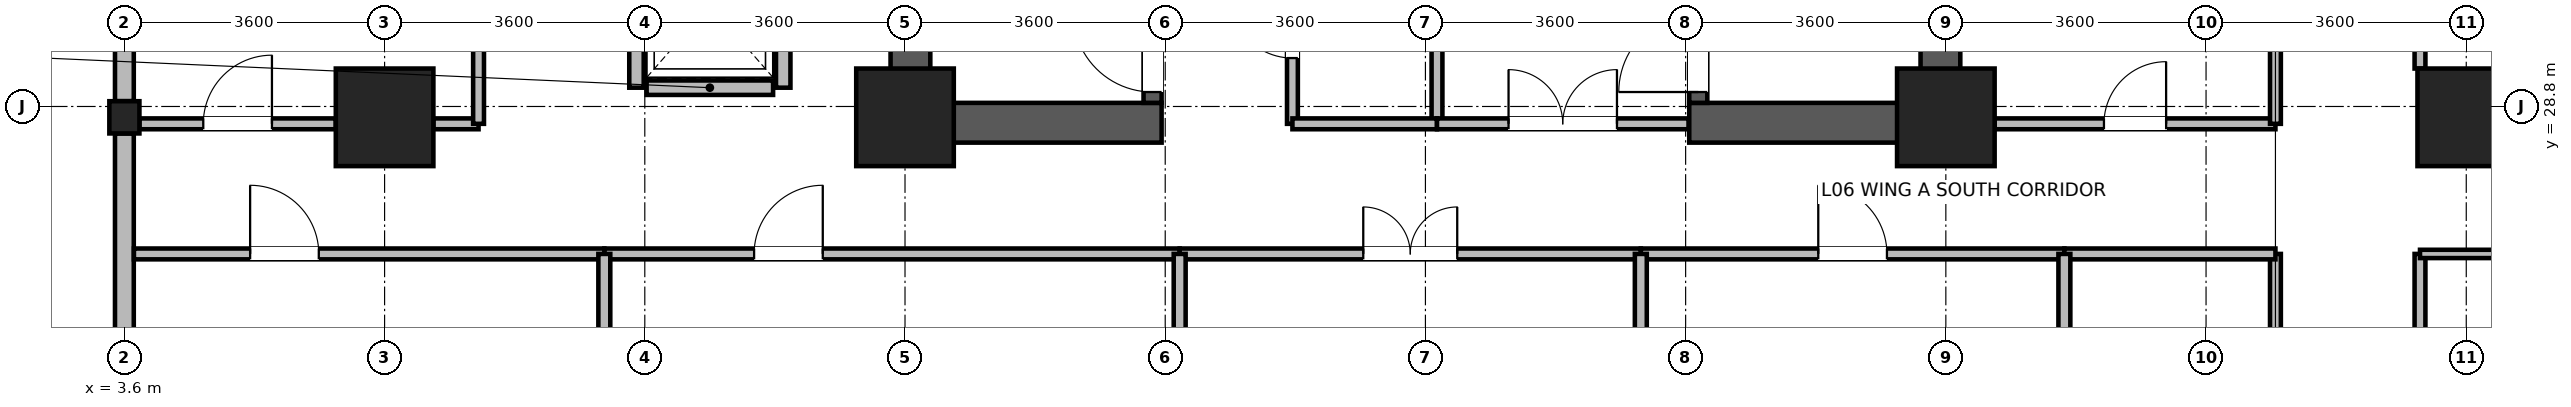
"""IFC4 building model, lengths in metres.
Left out: names, types, materials, properties, quantities, classifications, styles, units other than length and angle.
Written with IfcOpenShell. Run it as: python <this file> out.ifc"""

import sys

from ifc_helpers import new_model, si_unit, direction, frame, frame_2d, origin, origin_2d, place, context, subcontext, project, spatial, rectangle, i_section, extrude, source, transform, mapped, element, fill, save


model = new_model("IFC4")
c1 = context("Model", 3, precision=1e-05, world=origin(), true_north=direction((0.0, 1.0)))
c2 = subcontext(c1, "Body", "Model", "MODEL_VIEW")
j1 = project(units=[si_unit("LENGTHUNIT", "METRE"), si_unit("PLANEANGLEUNIT", "RADIAN")], contexts=[c1])
p1 = place(None, origin())
s1 = spatial("IfcSite", under=j1, at=p1, CompositionType="ELEMENT")
p2 = place(p1, origin())
s2 = spatial("IfcBuilding", under=s1, at=p2, CompositionType="ELEMENT")
p3 = place(p2, frame((0.0, 0.0, 29.0)))
s3 = spatial("IfcBuildingStorey", under=s2, at=p3, CompositionType="ELEMENT", Elevation=29.0)
for number, where, z_axis, x_axis in (
    (1, (14.475, 28.3, 0.0), (0.0, 0.0, 1.0), (0.0, 1.0, 0.0)),
    (2, (28.725, 28.3, 0.0), (0.0, 0.0, 1.0), (0.0, 1.0, 0.0)),
):
    element("IfcWall", number, at=place(p3, frame(where, z_axis=z_axis, x_axis=x_axis)), inside=s3, PredefinedType="SHEAR", context=c2, shape_type="SweptSolid", body=[
        extrude(rectangle(XDim=8.1, YDim=0.55, at=frame_2d((4.05, 0.0))), origin(), (0.0, 0.0, 1.0), 3.45),
    ])
for number, where, z_axis, x_axis in (
    (3, (14.75, 28.575, 0.0), (0.0, 0.0, 1.0), (1.0, 0.0, 0.0)),
    (4, (25.25, 28.575, 0.0), (0.0, 0.0, 1.0), (1.0, 0.0, 0.0)),
):
    element("IfcWall", number, at=place(p3, frame(where, z_axis=z_axis, x_axis=x_axis)), inside=s3, PredefinedType="SHEAR", context=c2, shape_type="SweptSolid", body=[
        extrude(rectangle(XDim=3.2, YDim=0.55, at=frame_2d((1.6, 0.0))), origin(), (0.0, 0.0, 1.0), 3.45),
    ])
p4 = place(p3, frame((17.825, 28.85, 0.0), z_axis=(0.0, 0.0, 1.0), x_axis=(0.0, 1.0, 0.0)))
e5 = element("IfcWall", 5, at=p4, inside=s3, PredefinedType="SHEAR", context=c2, shape_type="SweptSolid", body=[
    extrude(rectangle(XDim=7.0, YDim=0.25, at=frame_2d((3.5, 0.0))), origin(), (0.0, 0.0, 1.0), 3.45),
])
p5 = place(p4, frame((0.15, 0.0, 0.0)))
e6 = element("IfcOpeningElement", 6, at=p5, cuts=e5, PredefinedType="OPENING", context=c2, shape_type="SweptSolid", body=[
    extrude(rectangle(XDim=1.1, YDim=2.08, at=frame_2d((0.55, 1.04))), frame((0.0, 0.135, 0.0), z_axis=(0.0, -1.0, 0.0), x_axis=(1.0, 0.0, 0.0)), (0.0, 0.0, 1.0), 0.27),
])
p6 = place(p3, frame((25.375, 28.85, 0.0), z_axis=(0.0, 0.0, 1.0), x_axis=(0.0, 1.0, 0.0)))
e7 = element("IfcWall", 7, at=p6, inside=s3, PredefinedType="SHEAR", context=c2, shape_type="SweptSolid", body=[
    extrude(rectangle(XDim=7.0, YDim=0.25, at=frame_2d((3.5, 0.0))), origin(), (0.0, 0.0, 1.0), 3.45),
])
p7 = place(p6, frame((0.15, 0.0, 0.0)))
e8 = element("IfcOpeningElement", 8, at=p7, cuts=e7, PredefinedType="OPENING", context=c2, shape_type="SweptSolid", body=[
    extrude(rectangle(XDim=1.1, YDim=2.08, at=frame_2d((0.55, 1.04))), frame((0.0, 0.135, 0.0), z_axis=(0.0, -1.0, 0.0), x_axis=(1.0, 0.0, 0.0)), (0.0, 0.0, 1.0), 0.27),
])
m1 = source(origin(), c2, "Body", "SweptSolid", [
    extrude(rectangle(XDim=1.35, YDim=1.35, at=origin_2d()), origin(), (0.0, 0.0, 1.0), 3.7),
])
for number, where, z_axis, x_axis in (
    (9, (7.2, 28.65, 0.0), (0.0, 0.0, 1.0), (1.0, 0.0, 0.0)),
    (10, (14.4, 28.65, 0.0), (0.0, 0.0, 1.0), (1.0, 0.0, 0.0)),
    (11, (28.8, 28.65, 0.0), (0.0, 0.0, 1.0), (1.0, 0.0, 0.0)),
    (12, (36.0, 28.65, 0.0), (0.0, 0.0, 1.0), (1.0, 0.0, 0.0)),
):
    element("IfcColumn", number, at=place(p3, frame(where, z_axis=z_axis, x_axis=x_axis)), inside=s3, PredefinedType="COLUMN", context=c2, shape_type="MappedRepresentation", body=[
        mapped(m1, transform((0.0, 0.0, 0.0), x_axis=(1.0, 0.0, 0.0), y_axis=(0.0, 1.0, 0.0), z_axis=(0.0, 0.0, 1.0), scale=1.0)),
    ])
m2 = source(origin(), c2, "Body", "SweptSolid", [
    extrude(i_section(OverallWidth=0.416, OverallDepth=0.446, WebThickness=0.029, FlangeThickness=0.04, FilletRadius=0.015, at=origin_2d()), origin(), (0.0, 0.0, 1.0), 3.7),
])
p8 = place(p3, frame((3.6, 28.65, 0.0), z_axis=(0.0, 0.0, 1.0), x_axis=(1.0, 0.0, 0.0)))
e13 = element("IfcColumn", 13, at=p8, inside=s3, PredefinedType="COLUMN", context=c2, shape_type="MappedRepresentation", body=[
    mapped(m2, transform((0.0, 0.0, 0.0), x_axis=(1.0, 0.0, 0.0), y_axis=(0.0, 1.0, 0.0), z_axis=(0.0, 0.0, 1.0), scale=1.0)),
])
p9 = place(p3, frame((3.6, 28.874, 0.0), z_axis=(0.0, 0.0, 1.0), x_axis=(0.0, 1.0, 0.0)))
e14 = element("IfcWall", 14, at=p9, inside=s3, PredefinedType="STANDARD", context=c2, shape_type="SweptSolid", body=[
    extrude(rectangle(XDim=7.052, YDim=0.26, at=frame_2d((3.526, 0.0))), origin(), (0.0, 0.0, 1.0), 2.93),
])
p10 = place(p9, frame((0.863, 0.0, 0.85)))
e15 = element("IfcOpeningElement", 15, at=p10, cuts=e14, PredefinedType="OPENING", context=c2, shape_type="SweptSolid", body=[
    extrude(rectangle(XDim=1.8, YDim=1.85, at=frame_2d((0.9, 0.925))), frame((0.0, 0.14, 0.0), z_axis=(0.0, -1.0, 0.0), x_axis=(1.0, 0.0, 0.0)), (0.0, 0.0, 1.0), 0.28),
])
p11 = place(p9, frame((4.389, 0.0, 0.85)))
e16 = element("IfcOpeningElement", 16, at=p11, cuts=e14, PredefinedType="OPENING", context=c2, shape_type="SweptSolid", body=[
    extrude(rectangle(XDim=1.8, YDim=1.85, at=frame_2d((0.9, 0.925))), frame((0.0, 0.14, 0.0), z_axis=(0.0, -1.0, 0.0), x_axis=(1.0, 0.0, 0.0)), (0.0, 0.0, 1.0), 0.28),
])
p12 = place(p3, frame((3.6, 21.47, 0.0), z_axis=(0.0, 0.0, 1.0), x_axis=(0.0, 1.0, 0.0)))
e17 = element("IfcWall", 17, at=p12, inside=s3, PredefinedType="STANDARD", context=c2, shape_type="SweptSolid", body=[
    extrude(rectangle(XDim=6.956, YDim=0.26, at=frame_2d((3.478, 0.0))), origin(), (0.0, 0.0, 1.0), 3.43),
])
p13 = place(p12, frame((0.839, 0.0, 0.85)))
e18 = element("IfcOpeningElement", 18, at=p13, cuts=e17, PredefinedType="OPENING", context=c2, shape_type="SweptSolid", body=[
    extrude(rectangle(XDim=1.8, YDim=1.85, at=frame_2d((0.9, 0.925))), frame((0.0, 0.14, 0.0), z_axis=(0.0, -1.0, 0.0), x_axis=(1.0, 0.0, 0.0)), (0.0, 0.0, 1.0), 0.28),
])
p14 = place(p12, frame((3.003, 0.0, 0.85)))
e19 = element("IfcOpeningElement", 19, at=p14, cuts=e17, PredefinedType="OPENING", context=c2, shape_type="SweptSolid", body=[
    extrude(rectangle(XDim=0.95, YDim=1.75, at=frame_2d((0.475, 0.875))), frame((0.0, 0.14, 0.0), z_axis=(0.0, -1.0, 0.0), x_axis=(1.0, 0.0, 0.0)), (0.0, 0.0, 1.0), 0.28),
])
p15 = place(p3, frame((10.825, 29.06, 0.0), z_axis=(0.0, 0.0, 1.0), x_axis=(1.0, 0.0, 0.0)))
e20 = element("IfcWall", 20, at=p15, inside=s3, PredefinedType="PARTITIONING", context=c2, shape_type="SweptSolid", body=[
    extrude(rectangle(XDim=1.75, YDim=0.2, at=frame_2d((0.875, 0.0))), origin(), (0.0, 0.0, 1.0), 3.43),
])
for number, where, z_axis, x_axis in (
    (21, (10.685, 29.06, 0.0), (0.0, 0.0, 1.0), (0.0, 1.0, 0.0)),
    (22, (12.715, 29.06, 0.0), (0.0, 0.0, 1.0), (0.0, 1.0, 0.0)),
):
    element("IfcWall", number, at=place(p3, frame(where, z_axis=z_axis, x_axis=x_axis)), inside=s3, PredefinedType="PARTITIONING", context=c2, shape_type="SweptSolid", body=[
        extrude(rectangle(XDim=2.28, YDim=0.2, at=frame_2d((1.14, 0.0))), origin(), (0.0, 0.0, 1.0), 3.43),
    ])
p16 = place(p3, frame((35.36, 22.275, 0.0), z_axis=(0.0, 0.0, 1.0), x_axis=(0.0, 1.0, 0.0)))
e23 = element("IfcWall", 23, at=p16, inside=s3, PredefinedType="PARTITIONING", context=c2, shape_type="SweptSolid", body=[
    extrude(rectangle(XDim=4.485, YDim=0.15, at=frame_2d((2.243, 0.0))), origin(), (0.0, 0.0, 1.0), 3.43),
])
p17 = place(p3, frame((10.24, 26.76, 0.0), z_axis=(0.0, 0.0, 1.0), x_axis=(1.0, 0.0, 0.0)))
e24 = element("IfcWall", 24, at=p17, inside=s3, PredefinedType="PARTITIONING", context=c2, shape_type="SweptSolid", body=[
    extrude(rectangle(XDim=7.96, YDim=0.15, at=frame_2d((3.98, 0.0))), origin(), (0.0, 0.0, 1.0), 3.43),
])
p18 = place(p17, frame((2.072, 0.0, 0.0)))
e25 = element("IfcOpeningElement", 25, at=p18, cuts=e24, PredefinedType="OPENING", context=c2, shape_type="SweptSolid", body=[
    extrude(rectangle(XDim=0.95, YDim=2.1, at=frame_2d((0.475, 1.05))), frame((0.0, 0.085, 0.0), z_axis=(0.0, -1.0, 0.0), x_axis=(1.0, 0.0, 0.0)), (0.0, 0.0, 1.0), 0.17),
])
p19 = place(p3, frame((35.36, 29.325, 0.0), z_axis=(0.0, 0.0, 1.0), x_axis=(0.0, 1.0, 0.0)))
e26 = element("IfcWall", 26, at=p19, inside=s3, PredefinedType="PARTITIONING", context=c2, shape_type="SweptSolid", body=[
    extrude(rectangle(XDim=6.15, YDim=0.15, at=frame_2d((3.075, 0.0))), origin(), (0.0, 0.0, 1.0), 3.43),
])
p20 = place(p19, frame((2.425, 0.0, 0.0)))
e27 = element("IfcOpeningElement", 27, at=p20, cuts=e26, PredefinedType="OPENING", context=c2, shape_type="SweptSolid", body=[
    extrude(rectangle(XDim=1.3, YDim=2.12, at=frame_2d((0.65, 1.06))), frame((0.0, 0.085, 0.0), z_axis=(0.0, -1.0, 0.0), x_axis=(1.0, 0.0, 0.0)), (0.0, 0.0, 1.0), 0.17),
])
p21 = place(p3, frame((3.732, 26.76, 0.0), z_axis=(0.0, 0.0, 1.0), x_axis=(1.0, 0.0, 0.0)))
e28 = element("IfcWall", 28, at=p21, inside=s3, PredefinedType="PARTITIONING", context=c2, shape_type="SweptSolid", body=[
    extrude(rectangle(XDim=6.508, YDim=0.15, at=frame_2d((3.254, 0.0))), origin(), (0.0, 0.0, 1.0), 3.43),
])
p22 = place(p21, frame((1.608, 0.0, 0.0)))
e29 = element("IfcOpeningElement", 29, at=p22, cuts=e28, PredefinedType="OPENING", context=c2, shape_type="SweptSolid", body=[
    extrude(rectangle(XDim=0.95, YDim=2.1, at=frame_2d((0.475, 1.05))), frame((0.0, 0.085, 0.0), z_axis=(0.0, -1.0, 0.0), x_axis=(1.0, 0.0, 0.0)), (0.0, 0.0, 1.0), 0.17),
])
p23 = place(p3, frame((18.2, 26.76, 0.0), z_axis=(0.0, 0.0, 1.0), x_axis=(1.0, 0.0, 0.0)))
e30 = element("IfcWall", 30, at=p23, inside=s3, PredefinedType="PARTITIONING", context=c2, shape_type="SweptSolid", body=[
    extrude(rectangle(XDim=6.38, YDim=0.15, at=frame_2d((3.19, 0.0))), origin(), (0.0, 0.0, 1.0), 3.43),
])
p24 = place(p23, frame((2.54, 0.0, 0.0)))
e31 = element("IfcOpeningElement", 31, at=p24, cuts=e30, PredefinedType="OPENING", context=c2, shape_type="SweptSolid", body=[
    extrude(rectangle(XDim=1.3, YDim=2.12, at=frame_2d((0.65, 1.06))), frame((0.0, 0.085, 0.0), z_axis=(0.0, -1.0, 0.0), x_axis=(1.0, 0.0, 0.0)), (0.0, 0.0, 1.0), 0.17),
])
p25 = place(p3, frame((24.58, 26.76, 0.0), z_axis=(0.0, 0.0, 1.0), x_axis=(1.0, 0.0, 0.0)))
e32 = element("IfcWall", 32, at=p25, inside=s3, PredefinedType="PARTITIONING", context=c2, shape_type="SweptSolid", body=[
    extrude(rectangle(XDim=5.86, YDim=0.15, at=frame_2d((2.93, 0.0))), origin(), (0.0, 0.0, 1.0), 3.43),
])
p26 = place(p25, frame((2.455, 0.0, 0.0)))
e33 = element("IfcOpeningElement", 33, at=p26, cuts=e32, PredefinedType="OPENING", context=c2, shape_type="SweptSolid", body=[
    extrude(rectangle(XDim=0.95, YDim=2.1, at=frame_2d((0.475, 1.05))), frame((0.0, 0.085, 0.0), z_axis=(0.0, -1.0, 0.0), x_axis=(1.0, 0.0, 0.0)), (0.0, 0.0, 1.0), 0.17),
])
p27 = place(p3, frame((33.36, 21.6, 0.0), z_axis=(0.0, 0.0, 1.0), x_axis=(0.0, 1.0, 0.0)))
e34 = element("IfcWall", 34, at=p27, inside=s3, PredefinedType="PARTITIONING", context=c2, shape_type="SweptSolid", body=[
    extrude(rectangle(XDim=5.16, YDim=0.15, at=frame_2d((2.58, 0.0))), origin(), (0.0, 0.0, 1.0), 3.43),
])
p28 = place(p27, frame((2.15, 0.0, 0.0)))
e35 = element("IfcOpeningElement", 35, at=p28, cuts=e34, PredefinedType="OPENING", context=c2, shape_type="SweptSolid", body=[
    extrude(rectangle(XDim=0.86, YDim=2.02, at=frame_2d((0.43, 1.01))), frame((0.0, 0.085, 0.0), z_axis=(0.0, -1.0, 0.0), x_axis=(1.0, 0.0, 0.0)), (0.0, 0.0, 1.0), 0.17),
])
p29 = place(p3, frame((3.808, 28.56, 0.0), z_axis=(0.0, 0.0, 1.0), x_axis=(1.0, 0.0, 0.0)))
e36 = element("IfcWall", 36, at=p29, inside=s3, PredefinedType="PARTITIONING", context=c2, shape_type="SweptSolid", body=[
    extrude(rectangle(XDim=2.717, YDim=0.15, at=frame_2d((1.358, 0.0))), origin(), (0.0, 0.0, 1.0), 2.78),
])
p30 = place(p29, frame((0.884, 0.0, 0.0)))
e37 = element("IfcOpeningElement", 37, at=p30, cuts=e36, PredefinedType="OPENING", context=c2, shape_type="SweptSolid", body=[
    extrude(rectangle(XDim=0.95, YDim=2.1, at=frame_2d((0.475, 1.05))), frame((0.0, 0.085, 0.0), z_axis=(0.0, -1.0, 0.0), x_axis=(1.0, 0.0, 0.0)), (0.0, 0.0, 1.0), 0.17),
])
p31 = place(p3, frame((7.875, 28.56, 0.0), z_axis=(0.0, 0.0, 1.0), x_axis=(1.0, 0.0, 0.0)))
e38 = element("IfcWall", 38, at=p31, inside=s3, PredefinedType="PARTITIONING", context=c2, shape_type="SweptSolid", body=[
    extrude(rectangle(XDim=0.625, YDim=0.15, at=frame_2d((0.312, 0.0))), origin(), (0.0, 0.0, 1.0), 2.78),
])
p32 = place(p3, frame((29.475, 28.56, 0.0), z_axis=(0.0, 0.0, 1.0), x_axis=(1.0, 0.0, 0.0)))
e39 = element("IfcWall", 39, at=p32, inside=s3, PredefinedType="PARTITIONING", context=c2, shape_type="SweptSolid", body=[
    extrude(rectangle(XDim=3.885, YDim=0.15, at=frame_2d((1.942, 0.0))), origin(), (0.0, 0.0, 1.0), 2.78),
])
p33 = place(p32, frame((1.512, 0.0, 0.0)))
e40 = element("IfcOpeningElement", 40, at=p33, cuts=e39, PredefinedType="OPENING", context=c2, shape_type="SweptSolid", body=[
    extrude(rectangle(XDim=0.86, YDim=2.02, at=frame_2d((0.43, 1.01))), frame((0.0, 0.085, 0.0), z_axis=(0.0, -1.0, 0.0), x_axis=(1.0, 0.0, 0.0)), (0.0, 0.0, 1.0), 0.17),
])
p34 = place(p3, frame((8.5, 28.56, 0.0), z_axis=(0.0, 0.0, 1.0), x_axis=(0.0, 1.0, 0.0)))
e41 = element("IfcWall", 41, at=p34, inside=s3, PredefinedType="PARTITIONING", context=c2, shape_type="SweptSolid", body=[
    extrude(rectangle(XDim=3.84, YDim=0.15, at=frame_2d((1.92, 0.0))), origin(), (0.0, 0.0, 1.0), 3.43),
])
p35 = place(p3, frame((33.36, 28.56, 0.0), z_axis=(0.0, 0.0, 1.0), x_axis=(0.0, 1.0, 0.0)))
e42 = element("IfcWall", 42, at=p35, inside=s3, PredefinedType="PARTITIONING", context=c2, shape_type="SweptSolid", body=[
    extrude(rectangle(XDim=3.08, YDim=0.15, at=frame_2d((1.54, 0.0))), origin(), (0.0, 0.0, 1.0), 3.43),
])
p36 = place(p3, frame((30.44, 26.76, 0.0), z_axis=(0.0, 0.0, 1.0), x_axis=(1.0, 0.0, 0.0)))
e43 = element("IfcWall", 43, at=p36, inside=s3, PredefinedType="PARTITIONING", context=c2, shape_type="SweptSolid", body=[
    extrude(rectangle(XDim=2.92, YDim=0.15, at=frame_2d((1.46, 0.0))), origin(), (0.0, 0.0, 1.0), 3.43),
])
p37 = place(p3, frame((19.76, 28.56, 0.0), z_axis=(0.0, 0.0, 1.0), x_axis=(0.0, 1.0, 0.0)))
e44 = element("IfcWall", 44, at=p37, inside=s3, PredefinedType="PARTITIONING", context=c2, shape_type="SweptSolid", body=[
    extrude(rectangle(XDim=2.68, YDim=0.15, at=frame_2d((1.34, 0.0))), origin(), (0.0, 0.0, 1.0), 3.43),
])
p38 = place(p37, frame((0.91, 0.0, 0.0)))
e45 = element("IfcOpeningElement", 45, at=p38, cuts=e44, PredefinedType="OPENING", context=c2, shape_type="SweptSolid", body=[
    extrude(rectangle(XDim=0.86, YDim=2.02, at=frame_2d((0.43, 1.01))), frame((0.0, 0.085, 0.0), z_axis=(0.0, -1.0, 0.0), x_axis=(1.0, 0.0, 0.0)), (0.0, 0.0, 1.0), 0.17),
])
p39 = place(p3, frame((21.76, 28.56, 0.0), z_axis=(0.0, 0.0, 1.0), x_axis=(0.0, 1.0, 0.0)))
e46 = element("IfcWall", 46, at=p39, inside=s3, PredefinedType="PARTITIONING", context=c2, shape_type="SweptSolid", body=[
    extrude(rectangle(XDim=2.68, YDim=0.15, at=frame_2d((1.34, 0.0))), origin(), (0.0, 0.0, 1.0), 3.43),
])
p40 = place(p3, frame((19.76, 28.56, 0.0), z_axis=(0.0, 0.0, 1.0), x_axis=(1.0, 0.0, 0.0)))
e47 = element("IfcWall", 47, at=p40, inside=s3, PredefinedType="PARTITIONING", context=c2, shape_type="SweptSolid", body=[
    extrude(rectangle(XDim=2.0, YDim=0.15, at=frame_2d((1.0, 0.0))), origin(), (0.0, 0.0, 1.0), 2.23),
])
p41 = place(p3, frame((18.2, 21.62, 0.0), z_axis=(0.0, 0.0, 1.0), x_axis=(0.0, 1.0, 0.0)))
e48 = element("IfcWall", 48, at=p41, inside=s3, PredefinedType="PARTITIONING", context=c2, shape_type="SweptSolid", body=[
    extrude(rectangle(XDim=5.14, YDim=0.165, at=frame_2d((2.57, 0.0))), origin(), (0.0, 0.0, 1.0), 3.07),
])
p42 = place(p3, frame((24.58, 21.62, 0.0), z_axis=(0.0, 0.0, 1.0), x_axis=(0.0, 1.0, 0.0)))
e49 = element("IfcWall", 49, at=p42, inside=s3, PredefinedType="PARTITIONING", context=c2, shape_type="SweptSolid", body=[
    extrude(rectangle(XDim=5.14, YDim=0.165, at=frame_2d((2.57, 0.0))), origin(), (0.0, 0.0, 1.0), 3.43),
])
p43 = place(p3, frame((30.44, 21.6, 0.0), z_axis=(0.0, 0.0, 1.0), x_axis=(0.0, 1.0, 0.0)))
e50 = element("IfcWall", 50, at=p43, inside=s3, PredefinedType="PARTITIONING", context=c2, shape_type="SweptSolid", body=[
    extrude(rectangle(XDim=5.16, YDim=0.165, at=frame_2d((2.58, 0.0))), origin(), (0.0, 0.0, 1.0), 3.43),
])
p44 = place(p3, frame((35.36, 26.76, 0.0), z_axis=(0.0, 0.0, 1.0), x_axis=(1.0, 0.0, 0.0)))
e51 = element("IfcWall", 51, at=p44, inside=s3, PredefinedType="PARTITIONING", context=c2, shape_type="SweptSolid", body=[
    extrude(rectangle(XDim=4.92, YDim=0.115, at=frame_2d((2.46, 0.0))), origin(), (0.0, 0.0, 1.0), 3.43),
])
p45 = place(p3, frame((21.76, 28.56, 0.0), z_axis=(0.0, 0.0, 1.0), x_axis=(1.0, 0.0, 0.0)))
e52 = element("IfcWall", 52, at=p45, inside=s3, PredefinedType="PARTITIONING", context=c2, shape_type="SweptSolid", body=[
    extrude(rectangle(XDim=3.48, YDim=0.15, at=frame_2d((1.74, 0.0))), origin(), (0.0, 0.0, 1.0), 2.23),
])
p46 = place(p45, frame((0.99, 0.0, 0.0)))
e53 = element("IfcOpeningElement", 53, at=p46, cuts=e52, PredefinedType="OPENING", context=c2, shape_type="SweptSolid", body=[
    extrude(rectangle(XDim=1.5, YDim=2.1, at=frame_2d((0.75, 1.05))), frame((0.0, 0.085, 0.0), z_axis=(0.0, -1.0, 0.0), x_axis=(1.0, 0.0, 0.0)), (0.0, 0.0, 1.0), 0.17),
])
p47 = place(p3, frame((10.24, 23.5, 0.0), z_axis=(0.0, 0.0, 1.0), x_axis=(0.0, 1.0, 0.0)))
e54 = element("IfcWall", 54, at=p47, inside=s3, PredefinedType="PARTITIONING", context=c2, shape_type="SweptSolid", body=[
    extrude(rectangle(XDim=3.26, YDim=0.165, at=frame_2d((1.63, 0.0))), origin(), (0.0, 0.0, 1.0), 3.43),
])
p48 = place(p5, origin())
e55 = element("IfcDoor", 55, at=p48, inside=s3, OperationType="SINGLE_SWING_RIGHT", PredefinedType="DOOR", context=c2, shape_type="SweptSolid", body=[
    extrude(rectangle(XDim=1.1, YDim=2.08, at=frame_2d((0.55, 1.04))), frame((0.0, 0.025, 0.0), z_axis=(0.0, -1.0, 0.0), x_axis=(1.0, 0.0, 0.0)), (0.0, 0.0, 1.0), 0.05),
])
fill(e6, e55)
p49 = place(p7, origin())
e56 = element("IfcDoor", 56, at=p49, inside=s3, OperationType="SINGLE_SWING_LEFT", PredefinedType="DOOR", context=c2, shape_type="SweptSolid", body=[
    extrude(rectangle(XDim=1.1, YDim=2.08, at=frame_2d((0.55, 1.04))), frame((0.0, 0.025, 0.0), z_axis=(0.0, -1.0, 0.0), x_axis=(1.0, 0.0, 0.0)), (0.0, 0.0, 1.0), 0.05),
])
fill(e8, e56)
p50 = place(p18, origin())
e57 = element("IfcDoor", 57, at=p50, inside=s3, OperationType="SINGLE_SWING_RIGHT", PredefinedType="DOOR", context=c2, shape_type="SweptSolid", body=[
    extrude(rectangle(XDim=0.95, YDim=2.1, at=frame_2d((0.475, 1.05))), frame((0.0, 0.025, 0.0), z_axis=(0.0, -1.0, 0.0), x_axis=(1.0, 0.0, 0.0)), (0.0, 0.0, 1.0), 0.05),
])
fill(e25, e57)
p51 = place(p22, origin())
e58 = element("IfcDoor", 58, at=p51, inside=s3, OperationType="SINGLE_SWING_LEFT", PredefinedType="DOOR", context=c2, shape_type="SweptSolid", body=[
    extrude(rectangle(XDim=0.95, YDim=2.1, at=frame_2d((0.475, 1.05))), frame((0.0, 0.025, 0.0), z_axis=(0.0, -1.0, 0.0), x_axis=(1.0, 0.0, 0.0)), (0.0, 0.0, 1.0), 0.05),
])
fill(e29, e58)
p52 = place(p24, origin())
e59 = element("IfcDoor", 59, at=p52, inside=s3, OperationType="DOUBLE_DOOR_SINGLE_SWING", PredefinedType="DOOR", context=c2, shape_type="SweptSolid", body=[
    extrude(rectangle(XDim=1.3, YDim=2.12, at=frame_2d((0.65, 1.06))), frame((0.0, 0.025, 0.0), z_axis=(0.0, -1.0, 0.0), x_axis=(1.0, 0.0, 0.0)), (0.0, 0.0, 1.0), 0.05),
])
fill(e31, e59)
p53 = place(p26, origin())
e60 = element("IfcDoor", 60, at=p53, inside=s3, OperationType="SINGLE_SWING_LEFT", PredefinedType="DOOR", context=c2, shape_type="SweptSolid", body=[
    extrude(rectangle(XDim=0.95, YDim=2.1, at=frame_2d((0.475, 1.05))), frame((0.0, 0.025, 0.0), z_axis=(0.0, -1.0, 0.0), x_axis=(1.0, 0.0, 0.0)), (0.0, 0.0, 1.0), 0.05),
])
fill(e33, e60)
p54 = place(p30, origin())
e61 = element("IfcDoor", 61, at=p54, inside=s3, OperationType="SINGLE_SWING_RIGHT", PredefinedType="DOOR", context=c2, shape_type="SweptSolid", body=[
    extrude(rectangle(XDim=0.95, YDim=2.1, at=frame_2d((0.475, 1.05))), frame((0.0, 0.025, 0.0), z_axis=(0.0, -1.0, 0.0), x_axis=(1.0, 0.0, 0.0)), (0.0, 0.0, 1.0), 0.05),
])
fill(e37, e61)
p55 = place(p33, origin())
e62 = element("IfcDoor", 62, at=p55, inside=s3, OperationType="SINGLE_SWING_RIGHT", PredefinedType="DOOR", context=c2, shape_type="SweptSolid", body=[
    extrude(rectangle(XDim=0.86, YDim=2.02, at=frame_2d((0.43, 1.01))), frame((0.0, 0.025, 0.0), z_axis=(0.0, -1.0, 0.0), x_axis=(1.0, 0.0, 0.0)), (0.0, 0.0, 1.0), 0.05),
])
fill(e40, e62)
p56 = place(p38, origin())
e63 = element("IfcDoor", 63, at=p56, inside=s3, OperationType="SINGLE_SWING_RIGHT", PredefinedType="DOOR", context=c2, shape_type="SweptSolid", body=[
    extrude(rectangle(XDim=0.86, YDim=2.02, at=frame_2d((0.43, 1.01))), frame((0.0, 0.025, 0.0), z_axis=(0.0, -1.0, 0.0), x_axis=(1.0, 0.0, 0.0)), (0.0, 0.0, 1.0), 0.05),
])
fill(e45, e63)
p57 = place(p46, origin())
e64 = element("IfcDoor", 64, at=p57, inside=s3, OperationType="DOUBLE_DOOR_SINGLE_SWING", PredefinedType="DOOR", context=c2, shape_type="SweptSolid", body=[
    extrude(rectangle(XDim=1.5, YDim=2.1, at=frame_2d((0.75, 1.05))), frame((0.0, 0.025, 0.0), z_axis=(0.0, -1.0, 0.0), x_axis=(1.0, 0.0, 0.0)), (0.0, 0.0, 1.0), 0.05),
])
fill(e53, e64)
save(model, sys.argv[1])
